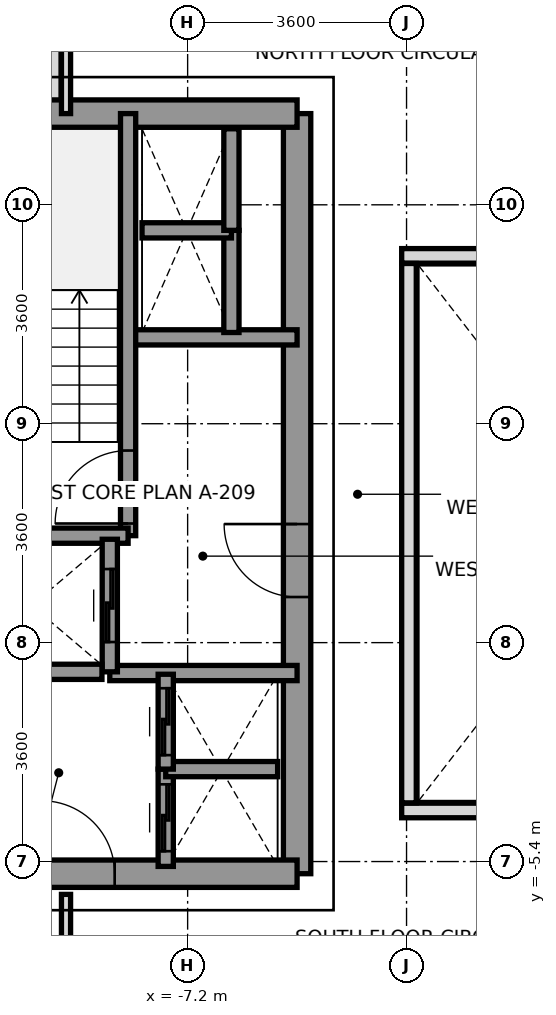
"""IFC4 building model, lengths in metres.
Left out: names, types, materials, properties, quantities, classifications, styles, units other than length and angle.
Written with IfcOpenShell. Run it as: python <this file> out.ifc"""

import sys

from ifc_helpers import new_model, si_unit, direction, frame, frame_2d, origin, place, context, subcontext, project, spatial, rectangle, extrude, source, transform, mapped, element, fill, save


model = new_model("IFC4")
c1 = context("Model", 3, precision=1e-05, world=origin(), true_north=direction((0.0, 1.0)))
c2 = subcontext(c1, "Body", "Model", "MODEL_VIEW")
j1 = project(units=[si_unit("LENGTHUNIT", "METRE"), si_unit("PLANEANGLEUNIT", "RADIAN")], contexts=[c1])
p1 = place(None, origin())
s1 = spatial("IfcSite", under=j1, at=p1, CompositionType="ELEMENT")
p2 = place(p1, origin())
s2 = spatial("IfcBuilding", under=s1, at=p2, CompositionType="ELEMENT")
p3 = place(p2, frame((0.0, 0.0, 131.2)))
s3 = spatial("IfcBuildingStorey", under=s2, at=p3, CompositionType="ELEMENT", Elevation=131.2)
p4 = place(p3, frame((-9.4, 6.953, 0.0), z_axis=(0.0, 0.0, 1.0), x_axis=(0.0, 1.0, 0.0)))
e1 = element("IfcWall", 1, at=p4, inside=s3, PredefinedType="PARAPET", context=c2, shape_type="SweptSolid", body=[
    extrude(rectangle(XDim=1.519, YDim=0.24, at=frame_2d((0.76, 0.0))), origin(), (0.0, 0.0, 1.0), 1.15),
])
p5 = place(p3, frame((-5.4, -5.6, 0.0), z_axis=(0.0, 0.0, 1.0), x_axis=(0.0, 1.0, 0.0)))
e2 = element("IfcWall", 2, at=p5, inside=s3, PredefinedType="SHEAR", context=c2, shape_type="SweptSolid", body=[
    extrude(rectangle(XDim=12.5, YDim=0.45, at=frame_2d((6.25, 0.0))), origin(), (0.0, 0.0, 1.0), 3.2),
])
p6 = place(p5, frame((4.55, 0.0, 0.0)))
e3 = element("IfcOpeningElement", 3, at=p6, cuts=e2, PredefinedType="OPENING", context=c2, shape_type="SweptSolid", body=[
    extrude(rectangle(XDim=1.2, YDim=2.2, at=frame_2d((0.6, 1.1))), frame((0.0, 0.235, 0.0), z_axis=(0.0, -1.0, 0.0), x_axis=(1.0, 0.0, 0.0)), (0.0, 0.0, 1.0), 0.47),
])
p7 = place(p3, frame((-11.381, 6.9, 0.0), z_axis=(0.0, 0.0, 1.0), x_axis=(1.0, 0.0, 0.0)))
e4 = element("IfcWall", 4, at=p7, inside=s3, PredefinedType="SHEAR", context=c2, shape_type="SweptSolid", body=[
    extrude(rectangle(XDim=5.981, YDim=0.45, at=frame_2d((2.991, 0.0))), origin(), (0.0, 0.0, 1.0), 3.2),
])
p8 = place(p3, frame((-13.2, -5.6, 0.0), z_axis=(0.0, 0.0, 1.0), x_axis=(1.0, 0.0, 0.0)))
e5 = element("IfcWall", 5, at=p8, inside=s3, PredefinedType="SHEAR", context=c2, shape_type="SweptSolid", body=[
    extrude(rectangle(XDim=7.8, YDim=0.45, at=frame_2d((3.9, 0.0))), origin(), (0.0, 0.0, 1.0), 3.2),
])
p9 = place(p8, frame((3.6, 0.0, 0.0)))
e6 = element("IfcOpeningElement", 6, at=p9, cuts=e5, PredefinedType="OPENING", context=c2, shape_type="SweptSolid", body=[
    extrude(rectangle(XDim=1.2, YDim=2.2, at=frame_2d((0.6, 1.1))), frame((0.0, 0.235, 0.0), z_axis=(0.0, -1.0, 0.0), x_axis=(1.0, 0.0, 0.0)), (0.0, 0.0, 1.0), 0.47),
])
p10 = place(p3, frame((-8.18, 3.22, 0.0), z_axis=(0.0, 0.0, 1.0), x_axis=(1.0, 0.0, 0.0)))
e7 = element("IfcWall", 7, at=p10, inside=s3, PredefinedType="SOLIDWALL", context=c2, shape_type="SweptSolid", body=[
    extrude(rectangle(XDim=2.78, YDim=0.25, at=frame_2d((1.39, 0.0))), origin(), (0.0, 0.0, 1.0), 3.2),
])
p11 = place(p3, frame((-8.48, -2.3, 0.0), z_axis=(0.0, 0.0, 1.0), x_axis=(1.0, 0.0, 0.0)))
e8 = element("IfcWall", 8, at=p11, inside=s3, PredefinedType="SOLIDWALL", context=c2, shape_type="SweptSolid", body=[
    extrude(rectangle(XDim=3.08, YDim=0.25, at=frame_2d((1.54, 0.0))), origin(), (0.0, 0.0, 1.0), 3.2),
])
p12 = place(p3, frame((-8.179, -0.041, 0.0), z_axis=(0.0, 0.0, 1.0), x_axis=(0.0, 1.0, 0.0)))
e9 = element("IfcWall", 9, at=p12, inside=s3, PredefinedType="SOLIDWALL", context=c2, shape_type="SweptSolid", body=[
    extrude(rectangle(XDim=6.941, YDim=0.25, at=frame_2d((3.47, 0.0))), origin(), (0.0, 0.0, 1.0), 3.2),
])
p13 = place(p12, frame((0.2, 0.0, 0.0)))
e10 = element("IfcOpeningElement", 10, at=p13, cuts=e9, PredefinedType="OPENING", context=c2, shape_type="SweptSolid", body=[
    extrude(rectangle(XDim=1.2, YDim=2.2, at=frame_2d((0.6, 1.1))), frame((0.0, 0.135, 0.0), z_axis=(0.0, -1.0, 0.0), x_axis=(1.0, 0.0, 0.0)), (0.0, 0.0, 1.0), 0.27),
])
p14 = place(p3, frame((-11.381, -0.041, 0.0), z_axis=(0.0, 0.0, 1.0), x_axis=(1.0, 0.0, 0.0)))
e11 = element("IfcWall", 11, at=p14, inside=s3, PredefinedType="SOLIDWALL", context=c2, shape_type="SweptSolid", body=[
    extrude(rectangle(XDim=3.202, YDim=0.25, at=frame_2d((1.601, 0.0))), origin(), (0.0, 0.0, 1.0), 3.2),
])
p15 = place(p3, frame((-8.48, -2.28, 0.0), z_axis=(0.0, 0.0, 1.0), x_axis=(0.0, 1.0, 0.0)))
e12 = element("IfcWall", 12, at=p15, inside=s3, PredefinedType="SOLIDWALL", context=c2, shape_type="SweptSolid", body=[
    extrude(rectangle(XDim=2.18, YDim=0.25, at=frame_2d((1.09, 0.0))), origin(), (0.0, 0.0, 1.0), 3.2),
])
p16 = place(p15, frame((0.49, 0.0, 0.0)))
e13 = element("IfcOpeningElement", 13, at=p16, cuts=e12, PredefinedType="OPENING", context=c2, shape_type="SweptSolid", body=[
    extrude(rectangle(XDim=1.2, YDim=2.2, at=frame_2d((0.6, 1.1))), frame((0.0, 0.135, 0.0), z_axis=(0.0, -1.0, 0.0), x_axis=(1.0, 0.0, 0.0)), (0.0, 0.0, 1.0), 0.27),
])
p17 = place(p3, frame((-10.921, -2.28, 0.0), z_axis=(0.0, 0.0, 1.0), x_axis=(1.0, 0.0, 0.0)))
e14 = element("IfcWall", 14, at=p17, inside=s3, PredefinedType="SOLIDWALL", context=c2, shape_type="SweptSolid", body=[
    extrude(rectangle(XDim=2.312, YDim=0.25, at=frame_2d((1.156, 0.0))), origin(), (0.0, 0.0, 1.0), 3.2),
])
p18 = place(p3, frame((-7.56, -5.48, 0.0), z_axis=(0.0, 0.0, 1.0), x_axis=(0.0, 1.0, 0.0)))
e15 = element("IfcWall", 15, at=p18, inside=s3, PredefinedType="SOLIDWALL", context=c2, shape_type="SweptSolid", body=[
    extrude(rectangle(XDim=1.6, YDim=0.25, at=frame_2d((0.8, 0.0))), origin(), (0.0, 0.0, 1.0), 3.2),
])
p19 = place(p18, frame((0.25, 0.0, 0.0)))
e16 = element("IfcOpeningElement", 16, at=p19, cuts=e15, PredefinedType="OPENING", context=c2, shape_type="SweptSolid", body=[
    extrude(rectangle(XDim=1.1, YDim=2.2, at=frame_2d((0.55, 1.1))), frame((0.0, 0.135, 0.0), z_axis=(0.0, -1.0, 0.0), x_axis=(1.0, 0.0, 0.0)), (0.0, 0.0, 1.0), 0.27),
])
p20 = place(p3, frame((-7.56, -3.88, 0.0), z_axis=(0.0, 0.0, 1.0), x_axis=(1.0, 0.0, 0.0)))
e17 = element("IfcWall", 17, at=p20, inside=s3, PredefinedType="SOLIDWALL", context=c2, shape_type="SweptSolid", body=[
    extrude(rectangle(XDim=1.84, YDim=0.25, at=frame_2d((0.92, 0.0))), origin(), (0.0, 0.0, 1.0), 3.2),
])
p21 = place(p3, frame((-7.56, -3.88, 0.0), z_axis=(0.0, 0.0, 1.0), x_axis=(0.0, 1.0, 0.0)))
e18 = element("IfcWall", 18, at=p21, inside=s3, PredefinedType="SOLIDWALL", context=c2, shape_type="SweptSolid", body=[
    extrude(rectangle(XDim=1.56, YDim=0.25, at=frame_2d((0.78, 0.0))), origin(), (0.0, 0.0, 1.0), 3.2),
])
p22 = place(p21, frame((0.23, 0.0, 0.0)))
e19 = element("IfcOpeningElement", 19, at=p22, cuts=e18, PredefinedType="OPENING", context=c2, shape_type="SweptSolid", body=[
    extrude(rectangle(XDim=1.1, YDim=2.2, at=frame_2d((0.55, 1.1))), frame((0.0, 0.135, 0.0), z_axis=(0.0, -1.0, 0.0), x_axis=(1.0, 0.0, 0.0)), (0.0, 0.0, 1.0), 0.27),
])
p23 = place(p3, frame((-6.48, 3.3, 0.0), z_axis=(0.0, 0.0, 1.0), x_axis=(0.0, 1.0, 0.0)))
e20 = element("IfcWall", 20, at=p23, inside=s3, PredefinedType="SOLIDWALL", context=c2, shape_type="SweptSolid", body=[
    extrude(rectangle(XDim=1.68, YDim=0.25, at=frame_2d((0.84, 0.0))), origin(), (0.0, 0.0, 1.0), 3.2),
])
p24 = place(p3, frame((-7.95, 4.98, 0.0), z_axis=(0.0, 0.0, 1.0), x_axis=(1.0, 0.0, 0.0)))
e21 = element("IfcWall", 21, at=p24, inside=s3, PredefinedType="SOLIDWALL", context=c2, shape_type="SweptSolid", body=[
    extrude(rectangle(XDim=1.47, YDim=0.25, at=frame_2d((0.735, 0.0))), origin(), (0.0, 0.0, 1.0), 3.2),
])
p25 = place(p3, frame((-6.48, 4.98, 0.0), z_axis=(0.0, 0.0, 1.0), x_axis=(0.0, 1.0, 0.0)))
e22 = element("IfcWall", 22, at=p25, inside=s3, PredefinedType="SOLIDWALL", context=c2, shape_type="SweptSolid", body=[
    extrude(rectangle(XDim=1.67, YDim=0.25, at=frame_2d((0.835, 0.0))), origin(), (0.0, 0.0, 1.0), 3.2),
])
p26 = place(p3, frame((-9.2, 6.9, 0.0), z_axis=(0.0, 0.0, 1.0), x_axis=(0.0, 1.0, 0.0)))
e23 = element("IfcWall", 23, at=p26, inside=s3, PredefinedType="PARTITIONING", context=c2, shape_type="SweptSolid", body=[
    extrude(rectangle(XDim=8.78, YDim=0.15, at=frame_2d((4.39, 0.0))), origin(), (0.0, 0.0, 1.0), 2.7),
])
p27 = place(p3, frame((-9.2, -15.68, 0.0), z_axis=(0.0, 0.0, 1.0), x_axis=(0.0, 1.0, 0.0)))
e24 = element("IfcWall", 24, at=p27, inside=s3, PredefinedType="PARTITIONING", context=c2, shape_type="SweptSolid", body=[
    extrude(rectangle(XDim=9.74, YDim=0.15, at=frame_2d((4.87, 0.0))), origin(), (0.0, 0.0, 1.0), 2.7),
])
for number, where, z_axis, x_axis in (
    (25, (-3.68, -4.56, 0.0), (0.0, 0.0, 1.0), (1.0, 0.0, 0.0)),
    (26, (-3.68, 4.56, 0.0), (0.0, 0.0, 1.0), (1.0, 0.0, 0.0)),
):
    element("IfcWall", number, at=place(p3, frame(where, z_axis=z_axis, x_axis=x_axis)), inside=s3, PredefinedType="PARAPET", context=c2, shape_type="SweptSolid", body=[
        extrude(rectangle(XDim=7.36, YDim=0.24, at=frame_2d((3.68, 0.0))), origin(), (0.0, 0.0, 1.0), 1.15),
    ])
p28 = place(p3, frame((-3.56, -4.435, 0.0), z_axis=(0.0, 0.0, 1.0), x_axis=(0.0, 1.0, 0.0)))
e27 = element("IfcWall", 27, at=p28, inside=s3, PredefinedType="PARAPET", context=c2, shape_type="SweptSolid", body=[
    extrude(rectangle(XDim=8.87, YDim=0.24, at=frame_2d((4.435, 0.0))), origin(), (0.0, 0.0, 1.0), 1.15),
])
m1 = source(origin(), c2, "Body", "SweptSolid", [
    extrude(rectangle(XDim=1.2, YDim=2.2, at=frame_2d((0.6, 1.1))), frame((0.0, 0.025, 0.0), z_axis=(0.0, -1.0, 0.0), x_axis=(1.0, 0.0, 0.0)), (0.0, 0.0, 1.0), 0.05),
])
p29 = place(p13, origin())
e28 = element("IfcDoor", 28, at=p29, inside=s3, OperationType="SINGLE_SWING_LEFT", PredefinedType="DOOR", context=c2, shape_type="MappedRepresentation", body=[
    mapped(m1, transform((0.0, 0.0, 0.0), x_axis=(1.0, 0.0, 0.0), y_axis=(0.0, 1.0, 0.0), z_axis=(0.0, 0.0, 1.0), scale=1.0)),
])
fill(e10, e28)
p30 = place(p6, origin())
e29 = element("IfcDoor", 29, at=p30, inside=s3, OperationType="SINGLE_SWING_RIGHT", PredefinedType="DOOR", context=c2, shape_type="MappedRepresentation", body=[
    mapped(m1, transform((0.0, 0.0, 0.0), x_axis=(1.0, 0.0, 0.0), y_axis=(0.0, 1.0, 0.0), z_axis=(0.0, 0.0, 1.0), scale=1.0)),
])
fill(e3, e29)
p31 = place(p9, origin())
e30 = element("IfcDoor", 30, at=p31, inside=s3, OperationType="SINGLE_SWING_LEFT", PredefinedType="DOOR", context=c2, shape_type="MappedRepresentation", body=[
    mapped(m1, transform((0.0, 0.0, 0.0), x_axis=(1.0, 0.0, 0.0), y_axis=(0.0, 1.0, 0.0), z_axis=(0.0, 0.0, 1.0), scale=1.0)),
])
fill(e6, e30)
p32 = place(p16, origin())
e31 = element("IfcDoor", 31, at=p32, inside=s3, OperationType="SLIDING_TO_RIGHT", PredefinedType="DOOR", context=c2, shape_type="MappedRepresentation", body=[
    mapped(m1, transform((0.0, 0.0, 0.0), x_axis=(1.0, 0.0, 0.0), y_axis=(0.0, 1.0, 0.0), z_axis=(0.0, 0.0, 1.0), scale=1.0)),
])
fill(e13, e31)
m2 = source(origin(), c2, "Body", "SweptSolid", [
    extrude(rectangle(XDim=1.1, YDim=2.2, at=frame_2d((0.55, 1.1))), frame((0.0, 0.025, 0.0), z_axis=(0.0, -1.0, 0.0), x_axis=(1.0, 0.0, 0.0)), (0.0, 0.0, 1.0), 0.05),
])
p33 = place(p19, origin())
e32 = element("IfcDoor", 32, at=p33, inside=s3, OperationType="SLIDING_TO_LEFT", PredefinedType="DOOR", context=c2, shape_type="MappedRepresentation", body=[
    mapped(m2, transform((0.0, 0.0, 0.0), x_axis=(1.0, 0.0, 0.0), y_axis=(0.0, 1.0, 0.0), z_axis=(0.0, 0.0, 1.0), scale=1.0)),
])
fill(e16, e32)
p34 = place(p22, origin())
e33 = element("IfcDoor", 33, at=p34, inside=s3, OperationType="SLIDING_TO_LEFT", PredefinedType="DOOR", context=c2, shape_type="MappedRepresentation", body=[
    mapped(m2, transform((0.0, 0.0, 0.0), x_axis=(1.0, 0.0, 0.0), y_axis=(0.0, 1.0, 0.0), z_axis=(0.0, 0.0, 1.0), scale=1.0)),
])
fill(e19, e33)
save(model, sys.argv[1])
